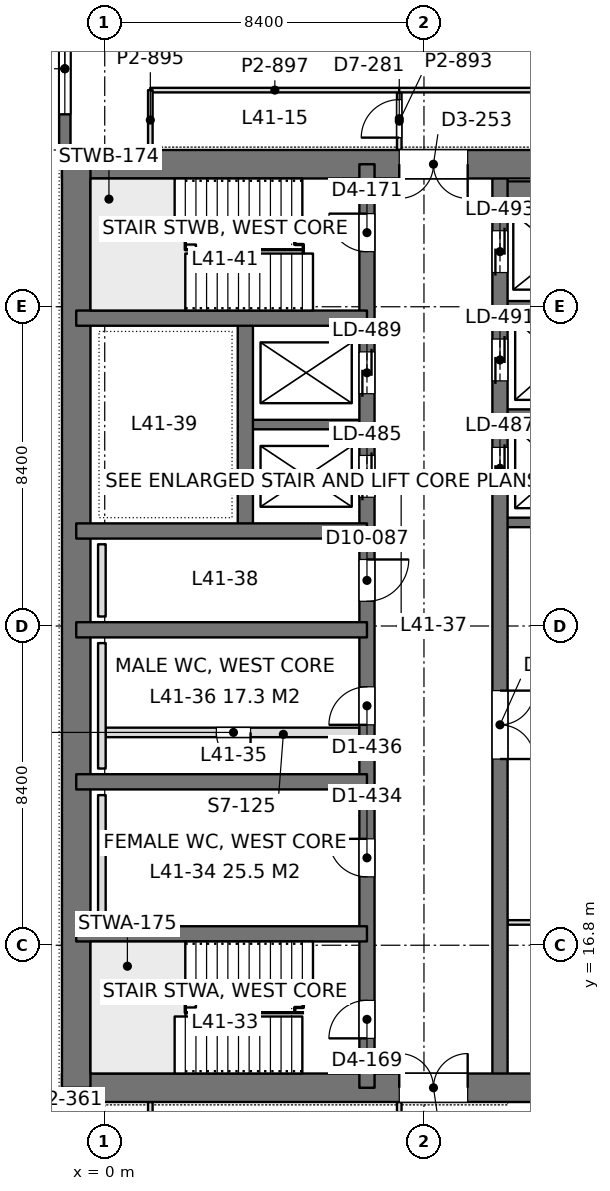
"""IFC4 building model, lengths in metres.
Left out: names, types, materials, properties, quantities, classifications, styles, units other than length and angle.
Written with IfcOpenShell. Run it as: python <this file> out.ifc"""

import sys

from ifc_helpers import new_model, si_unit, direction, frame, frame_2d, origin, place, context, subcontext, project, spatial, rectangle, extrude, element, fill, save


model = new_model("IFC4")
c1 = context("Model", 3, precision=1e-05, world=origin(), true_north=direction((0.0, 1.0)))
c2 = subcontext(c1, "Body", "Model", "MODEL_VIEW")
j1 = project(units=[si_unit("LENGTHUNIT", "METRE"), si_unit("PLANEANGLEUNIT", "RADIAN")], contexts=[c1])
p1 = place(None, origin())
s1 = spatial("IfcSite", under=j1, at=p1, CompositionType="ELEMENT")
p2 = place(p1, origin())
s2 = spatial("IfcBuilding", under=s1, at=p2, CompositionType="ELEMENT")
p3 = place(p2, frame((0.0, 0.0, 181.8)))
s3 = spatial("IfcBuildingStorey", under=s2, at=p3, CompositionType="ELEMENT", Elevation=181.8)
p4 = place(p3, frame((-1.125, 13.05, 0.0), z_axis=(0.0, 0.0, 1.0), x_axis=(1.0, 0.0, 0.0)))
e1 = element("IfcWall", 1, at=p4, inside=s3, PredefinedType="SHEAR", context=c2, shape_type="SweptSolid", body=[
    extrude(rectangle(XDim=17.85, YDim=0.75, at=frame_2d((8.925, 0.0))), origin(), (0.0, 0.0, 1.0), 4.2),
])
p5 = place(p4, frame((8.875, 0.0, 0.0)))
e2 = element("IfcOpeningElement", 2, at=p5, cuts=e1, PredefinedType="OPENING", context=c2, shape_type="SweptSolid", body=[
    extrude(rectangle(XDim=1.8, YDim=2.4, at=frame_2d((0.9, 1.2))), frame((0.0, 0.385, 0.0), z_axis=(0.0, -1.0, 0.0), x_axis=(1.0, 0.0, 0.0)), (0.0, 0.0, 1.0), 0.77),
])
p6 = place(p3, frame((-1.125, 37.35, 0.0), z_axis=(0.0, 0.0, 1.0), x_axis=(1.0, 0.0, 0.0)))
e3 = element("IfcWall", 3, at=p6, inside=s3, PredefinedType="SHEAR", context=c2, shape_type="SweptSolid", body=[
    extrude(rectangle(XDim=17.85, YDim=0.75, at=frame_2d((8.925, 0.0))), origin(), (0.0, 0.0, 1.0), 4.2),
])
p7 = place(p6, frame((8.875, 0.0, 0.0)))
e4 = element("IfcOpeningElement", 4, at=p7, cuts=e3, PredefinedType="OPENING", context=c2, shape_type="SweptSolid", body=[
    extrude(rectangle(XDim=1.8, YDim=2.4, at=frame_2d((0.9, 1.2))), frame((0.0, 0.385, 0.0), z_axis=(0.0, -1.0, 0.0), x_axis=(1.0, 0.0, 0.0)), (0.0, 0.0, 1.0), 0.77),
])
p8 = place(p3, frame((-0.75, 13.05, 0.0), z_axis=(0.0, 0.0, 1.0), x_axis=(0.0, 1.0, 0.0)))
e5 = element("IfcWall", 5, at=p8, inside=s3, PredefinedType="SHEAR", context=c2, shape_type="SweptSolid", body=[
    extrude(rectangle(XDim=24.3, YDim=0.75, at=frame_2d((12.15, 0.0))), origin(), (0.0, 0.0, 1.0), 4.2),
])
p9 = place(p3, frame((6.9, 13.05, 0.0), z_axis=(0.0, 0.0, 1.0), x_axis=(0.0, 1.0, 0.0)))
e6 = element("IfcWall", 6, at=p9, inside=s3, PredefinedType="SHEAR", context=c2, shape_type="SweptSolid", body=[
    extrude(rectangle(XDim=24.3, YDim=0.4, at=frame_2d((12.15, 0.0))), origin(), (0.0, 0.0, 1.0), 4.2),
])
p10 = place(p9, frame((1.3, 0.0, 0.0)))
e7 = element("IfcOpeningElement", 7, at=p10, cuts=e6, PredefinedType="OPENING", context=c2, shape_type="SweptSolid", body=[
    extrude(rectangle(XDim=1.0, YDim=2.2, at=frame_2d((0.5, 1.1))), frame((0.0, 0.21, 0.0), z_axis=(0.0, -1.0, 0.0), x_axis=(1.0, 0.0, 0.0)), (0.0, 0.0, 1.0), 0.42),
])
p11 = place(p9, frame((22.0, 0.0, 0.0)))
e8 = element("IfcOpeningElement", 8, at=p11, cuts=e6, PredefinedType="OPENING", context=c2, shape_type="SweptSolid", body=[
    extrude(rectangle(XDim=1.0, YDim=2.2, at=frame_2d((0.5, 1.1))), frame((0.0, 0.21, 0.0), z_axis=(0.0, -1.0, 0.0), x_axis=(1.0, 0.0, 0.0)), (0.0, 0.0, 1.0), 0.42),
])
p12 = place(p9, frame((5.55, 0.0, 0.0)))
e9 = element("IfcOpeningElement", 9, at=p12, cuts=e6, PredefinedType="OPENING", context=c2, shape_type="SweptSolid", body=[
    extrude(rectangle(XDim=1.0, YDim=2.2, at=frame_2d((0.5, 1.1))), frame((0.0, 0.21, 0.0), z_axis=(0.0, -1.0, 0.0), x_axis=(1.0, 0.0, 0.0)), (0.0, 0.0, 1.0), 0.42),
])
p13 = place(p9, frame((9.55, 0.0, 0.0)))
e10 = element("IfcOpeningElement", 10, at=p13, cuts=e6, PredefinedType="OPENING", context=c2, shape_type="SweptSolid", body=[
    extrude(rectangle(XDim=1.0, YDim=2.2, at=frame_2d((0.5, 1.1))), frame((0.0, 0.21, 0.0), z_axis=(0.0, -1.0, 0.0), x_axis=(1.0, 0.0, 0.0)), (0.0, 0.0, 1.0), 0.42),
])
p14 = place(p9, frame((12.8, 0.0, 0.0)))
e11 = element("IfcOpeningElement", 11, at=p14, cuts=e6, PredefinedType="OPENING", context=c2, shape_type="SweptSolid", body=[
    extrude(rectangle(XDim=1.1, YDim=2.2, at=frame_2d((0.55, 1.1))), frame((0.0, 0.21, 0.0), z_axis=(0.0, -1.0, 0.0), x_axis=(1.0, 0.0, 0.0)), (0.0, 0.0, 1.0), 0.42),
])
p15 = place(p9, frame((15.538, 0.0, 0.0)))
e12 = element("IfcOpeningElement", 12, at=p15, cuts=e6, PredefinedType="OPENING", context=c2, shape_type="SweptSolid", body=[
    extrude(rectangle(XDim=1.1, YDim=2.2, at=frame_2d((0.55, 1.1))), frame((0.0, 0.21, 0.0), z_axis=(0.0, -1.0, 0.0), x_axis=(1.0, 0.0, 0.0)), (0.0, 0.0, 1.0), 0.42),
])
p16 = place(p9, frame((18.262, 0.0, 0.0)))
e13 = element("IfcOpeningElement", 13, at=p16, cuts=e6, PredefinedType="OPENING", context=c2, shape_type="SweptSolid", body=[
    extrude(rectangle(XDim=1.1, YDim=2.2, at=frame_2d((0.55, 1.1))), frame((0.0, 0.21, 0.0), z_axis=(0.0, -1.0, 0.0), x_axis=(1.0, 0.0, 0.0)), (0.0, 0.0, 1.0), 0.42),
])
p17 = place(p3, frame((10.4, 13.05, 0.0), z_axis=(0.0, 0.0, 1.0), x_axis=(0.0, 1.0, 0.0)))
e14 = element("IfcWall", 14, at=p17, inside=s3, PredefinedType="SHEAR", context=c2, shape_type="SweptSolid", body=[
    extrude(rectangle(XDim=24.3, YDim=0.4, at=frame_2d((12.15, 0.0))), origin(), (0.0, 0.0, 1.0), 4.2),
])
p18 = place(p17, frame((15.75, 0.0, 0.0)))
e15 = element("IfcOpeningElement", 15, at=p18, cuts=e14, PredefinedType="OPENING", context=c2, shape_type="SweptSolid", body=[
    extrude(rectangle(XDim=1.1, YDim=2.2, at=frame_2d((0.55, 1.1))), frame((0.0, 0.21, 0.0), z_axis=(0.0, -1.0, 0.0), x_axis=(1.0, 0.0, 0.0)), (0.0, 0.0, 1.0), 0.42),
])
p19 = place(p17, frame((18.6, 0.0, 0.0)))
e16 = element("IfcOpeningElement", 16, at=p19, cuts=e14, PredefinedType="OPENING", context=c2, shape_type="SweptSolid", body=[
    extrude(rectangle(XDim=1.1, YDim=2.2, at=frame_2d((0.55, 1.1))), frame((0.0, 0.21, 0.0), z_axis=(0.0, -1.0, 0.0), x_axis=(1.0, 0.0, 0.0)), (0.0, 0.0, 1.0), 0.42),
])
p20 = place(p17, frame((21.45, 0.0, 0.0)))
e17 = element("IfcOpeningElement", 17, at=p20, cuts=e14, PredefinedType="OPENING", context=c2, shape_type="SweptSolid", body=[
    extrude(rectangle(XDim=1.1, YDim=2.2, at=frame_2d((0.55, 1.1))), frame((0.0, 0.21, 0.0), z_axis=(0.0, -1.0, 0.0), x_axis=(1.0, 0.0, 0.0)), (0.0, 0.0, 1.0), 0.42),
])
p21 = place(p17, frame((8.65, 0.0, 0.0)))
e18 = element("IfcOpeningElement", 18, at=p21, cuts=e14, PredefinedType="OPENING", context=c2, shape_type="SweptSolid", body=[
    extrude(rectangle(XDim=1.8, YDim=2.4, at=frame_2d((0.9, 1.2))), frame((0.0, 0.21, 0.0), z_axis=(0.0, -1.0, 0.0), x_axis=(1.0, 0.0, 0.0)), (0.0, 0.0, 1.0), 0.42),
])
for number, where, z_axis, x_axis in (
    (19, (-0.75, 17.1, 0.0), (0.0, 0.0, 1.0), (1.0, 0.0, 0.0)),
    (20, (-0.75, 21.1, 0.0), (0.0, 0.0, 1.0), (1.0, 0.0, 0.0)),
    (21, (-0.75, 25.1, 0.0), (0.0, 0.0, 1.0), (1.0, 0.0, 0.0)),
    (22, (-0.75, 27.7, 0.0), (0.0, 0.0, 1.0), (1.0, 0.0, 0.0)),
    (23, (-0.75, 33.3, 0.0), (0.0, 0.0, 1.0), (1.0, 0.0, 0.0)),
):
    element("IfcWall", number, at=place(p3, frame(where, z_axis=z_axis, x_axis=x_axis)), inside=s3, PredefinedType="SHEAR", context=c2, shape_type="SweptSolid", body=[
        extrude(rectangle(XDim=7.65, YDim=0.4, at=frame_2d((3.825, 0.0))), origin(), (0.0, 0.0, 1.0), 4.2),
    ])
p22 = place(p3, frame((3.7, 27.7, 0.0), z_axis=(0.0, 0.0, 1.0), x_axis=(0.0, 1.0, 0.0)))
e24 = element("IfcWall", 24, at=p22, inside=s3, PredefinedType="SHEAR", context=c2, shape_type="SweptSolid", body=[
    extrude(rectangle(XDim=5.6, YDim=0.4, at=frame_2d((2.8, 0.0))), origin(), (0.0, 0.0, 1.0), 4.2),
])
p23 = place(p3, frame((3.7, 30.5, 0.0), z_axis=(0.0, 0.0, 1.0), x_axis=(1.0, 0.0, 0.0)))
e25 = element("IfcWall", 25, at=p23, inside=s3, PredefinedType="SHEAR", context=c2, shape_type="SweptSolid", body=[
    extrude(rectangle(XDim=3.2, YDim=0.25, at=frame_2d((1.6, 0.0))), origin(), (0.0, 0.0, 1.0), 4.2),
])
p24 = place(p3, frame((10.4, 27.925, 0.0), z_axis=(0.0, 0.0, 1.0), x_axis=(1.0, 0.0, 0.0)))
e26 = element("IfcWall", 26, at=p24, inside=s3, PredefinedType="SHEAR", context=c2, shape_type="SweptSolid", body=[
    extrude(rectangle(XDim=5.95, YDim=0.25, at=frame_2d((2.975, 0.0))), origin(), (0.0, 0.0, 1.0), 4.2),
])
for number, where, z_axis, x_axis in (
    (27, (10.4, 30.775, 0.0), (0.0, 0.0, 1.0), (1.0, 0.0, 0.0)),
    (28, (10.4, 33.625, 0.0), (0.0, 0.0, 1.0), (1.0, 0.0, 0.0)),
):
    element("IfcWall", number, at=place(p3, frame(where, z_axis=z_axis, x_axis=x_axis)), inside=s3, PredefinedType="SHEAR", context=c2, shape_type="SweptSolid", body=[
        extrude(rectangle(XDim=3.2, YDim=0.25, at=frame_2d((1.6, 0.0))), origin(), (0.0, 0.0, 1.0), 4.2),
    ])
p25 = place(p3, frame((10.4, 36.625, 0.0), z_axis=(0.0, 0.0, 1.0), x_axis=(1.0, 0.0, 0.0)))
e29 = element("IfcWall", 29, at=p25, inside=s3, PredefinedType="SHEAR", context=c2, shape_type="SweptSolid", body=[
    extrude(rectangle(XDim=3.2, YDim=0.55, at=frame_2d((1.6, 0.0))), origin(), (0.0, 0.0, 1.0), 4.2),
])
p26 = place(p3, frame((-1.05, 8.4, 0.0), z_axis=(0.0, 0.0, 1.0), x_axis=(0.0, 1.0, 0.0)))
e30 = element("IfcWall", 30, at=p26, inside=s3, PredefinedType="SOLIDWALL", context=c2, shape_type="SweptSolid", body=[
    extrude(rectangle(XDim=4.275, YDim=0.3, at=frame_2d((2.138, 0.0))), origin(), (0.0, 0.0, 1.0), 4.05),
])
p27 = place(p26, frame((0.938, 0.0, 0.9)))
e31 = element("IfcOpeningElement", 31, at=p27, cuts=e30, PredefinedType="OPENING", context=c2, shape_type="SweptSolid", body=[
    extrude(rectangle(XDim=2.4, YDim=1.9, at=frame_2d((1.2, 0.95))), frame((0.0, 0.16, 0.0), z_axis=(0.0, -1.0, 0.0), x_axis=(1.0, 0.0, 0.0)), (0.0, 0.0, 1.0), 0.32),
])
p28 = place(p3, frame((-1.05, 37.725, 0.0), z_axis=(0.0, 0.0, 1.0), x_axis=(0.0, 1.0, 0.0)))
e32 = element("IfcWall", 32, at=p28, inside=s3, PredefinedType="SOLIDWALL", context=c2, shape_type="SweptSolid", body=[
    extrude(rectangle(XDim=4.275, YDim=0.3, at=frame_2d((2.137, 0.0))), origin(), (0.0, 0.0, 1.0), 4.05),
])
p29 = place(p28, frame((0.938, 0.0, 0.9)))
e33 = element("IfcOpeningElement", 33, at=p29, cuts=e32, PredefinedType="OPENING", context=c2, shape_type="SweptSolid", body=[
    extrude(rectangle(XDim=2.4, YDim=1.9, at=frame_2d((1.2, 0.95))), frame((0.0, 0.16, 0.0), z_axis=(0.0, -1.0, 0.0), x_axis=(1.0, 0.0, 0.0)), (0.0, 0.0, 1.0), 0.32),
])
p30 = place(p3, frame((10.598, 17.4, 0.0), z_axis=(0.0, 0.0, 1.0), x_axis=(1.0, 0.0, 0.0)))
e34 = element("IfcWall", 34, at=p30, inside=s3, PredefinedType="PARTITIONING", context=c2, shape_type="SweptSolid", body=[
    extrude(rectangle(XDim=5.904, YDim=0.12, at=frame_2d((2.952, 0.0))), origin(), (0.0, 0.0, 1.0), 3.55),
])
p31 = place(p3, frame((7.75, 11.158, 0.0), z_axis=(0.0, 0.0, 1.0), x_axis=(0.0, 1.0, 0.0)))
e35 = element("IfcWall", 35, at=p31, inside=s3, PredefinedType="PARTITIONING", context=c2, shape_type="SweptSolid", body=[
    extrude(rectangle(XDim=1.518, YDim=0.12, at=frame_2d((0.759, 0.0))), origin(), (0.0, 0.0, 1.0), 4.05),
])
p32 = place(p31, frame((0.192, 0.0, 0.0)))
e36 = element("IfcOpeningElement", 36, at=p32, cuts=e35, PredefinedType="OPENING", context=c2, shape_type="SweptSolid", body=[
    extrude(rectangle(XDim=1.0, YDim=2.4, at=frame_2d((0.5, 1.2))), frame((0.0, 0.07, 0.0), z_axis=(0.0, -1.0, 0.0), x_axis=(1.0, 0.0, 0.0)), (0.0, 0.0, 1.0), 0.14),
])
p33 = place(p3, frame((1.2, 11.1, 0.0), z_axis=(0.0, 0.0, 1.0), x_axis=(0.0, 1.0, 0.0)))
e37 = element("IfcWall", 37, at=p33, inside=s3, PredefinedType="PARTITIONING", context=c2, shape_type="SweptSolid", body=[
    extrude(rectangle(XDim=1.576, YDim=0.12, at=frame_2d((0.788, 0.0))), origin(), (0.0, 0.0, 1.0), 4.05),
])
p34 = place(p3, frame((7.748, 39.3, 0.0), z_axis=(0.0, 0.0, 1.0), x_axis=(1.0, 0.0, 0.0)))
e38 = element("IfcWall", 38, at=p34, inside=s3, PredefinedType="PARTITIONING", context=c2, shape_type="SweptSolid", body=[
    extrude(rectangle(XDim=34.904, YDim=0.12, at=frame_2d((17.452, 0.0))), origin(), (0.0, 0.0, 1.0), 3.55),
])
p35 = place(p34, frame((10.735, 0.0, 0.0)))
e39 = element("IfcOpeningElement", 39, at=p35, cuts=e38, PredefinedType="OPENING", context=c2, shape_type="SweptSolid", body=[
    extrude(rectangle(XDim=1.8, YDim=2.2, at=frame_2d((0.9, 1.1))), frame((0.0, 0.07, 0.0), z_axis=(0.0, -1.0, 0.0), x_axis=(1.0, 0.0, 0.0)), (0.0, 0.0, 1.0), 0.14),
])
p36 = place(p34, frame((22.369, 0.0, 0.0)))
e40 = element("IfcOpeningElement", 40, at=p36, cuts=e38, PredefinedType="OPENING", context=c2, shape_type="SweptSolid", body=[
    extrude(rectangle(XDim=1.8, YDim=2.2, at=frame_2d((0.9, 1.1))), frame((0.0, 0.07, 0.0), z_axis=(0.0, -1.0, 0.0), x_axis=(1.0, 0.0, 0.0)), (0.0, 0.0, 1.0), 0.14),
])
p37 = place(p3, frame((7.75, 37.724, 0.0), z_axis=(0.0, 0.0, 1.0), x_axis=(0.0, 1.0, 0.0)))
e41 = element("IfcWall", 41, at=p37, inside=s3, PredefinedType="PARTITIONING", context=c2, shape_type="SweptSolid", body=[
    extrude(rectangle(XDim=1.518, YDim=0.12, at=frame_2d((0.759, 0.0))), origin(), (0.0, 0.0, 1.0), 4.05),
])
p38 = place(p37, frame((0.326, 0.0, 0.0)))
e42 = element("IfcOpeningElement", 42, at=p38, cuts=e41, PredefinedType="OPENING", context=c2, shape_type="SweptSolid", body=[
    extrude(rectangle(XDim=1.0, YDim=2.4, at=frame_2d((0.5, 1.2))), frame((0.0, 0.07, 0.0), z_axis=(0.0, -1.0, 0.0), x_axis=(1.0, 0.0, 0.0)), (0.0, 0.0, 1.0), 0.14),
])
p39 = place(p3, frame((1.2, 39.3, 0.0), z_axis=(0.0, 0.0, 1.0), x_axis=(1.0, 0.0, 0.0)))
e43 = element("IfcWall", 43, at=p39, inside=s3, PredefinedType="PARTITIONING", context=c2, shape_type="SweptSolid", body=[
    extrude(rectangle(XDim=6.552, YDim=0.12, at=frame_2d((3.276, 0.0))), origin(), (0.0, 0.0, 1.0), 3.69),
])
p40 = place(p3, frame((1.2, 37.724, 0.0), z_axis=(0.0, 0.0, 1.0), x_axis=(0.0, 1.0, 0.0)))
e44 = element("IfcWall", 44, at=p40, inside=s3, PredefinedType="PARTITIONING", context=c2, shape_type="SweptSolid", body=[
    extrude(rectangle(XDim=1.576, YDim=0.12, at=frame_2d((0.788, 0.0))), origin(), (0.0, 0.0, 1.0), 4.05),
])
p41 = place(p3, frame((0.025, 22.4, 0.0), z_axis=(0.0, 0.0, 1.0), x_axis=(1.0, 0.0, 0.0)))
e45 = element("IfcWall", 45, at=p41, inside=s3, PredefinedType="PARTITIONING", context=c2, shape_type="SweptSolid", body=[
    extrude(rectangle(XDim=6.675, YDim=0.25, at=frame_2d((3.337, 0.0))), origin(), (0.0, 0.0, 1.0), 4.0),
])
p42 = place(p41, frame((2.913, 0.0, 0.0)))
e46 = element("IfcOpeningElement", 46, at=p42, cuts=e45, PredefinedType="OPENING", context=c2, shape_type="SweptSolid", body=[
    extrude(rectangle(XDim=0.9, YDim=2.2, at=frame_2d((0.45, 1.1))), frame((0.0, 0.135, 0.0), z_axis=(0.0, -1.0, 0.0), x_axis=(1.0, 0.0, 0.0)), (0.0, 0.0, 1.0), 0.27),
])
for number, where, z_axis, x_axis in (
    (47, (-0.075, 17.45, 0.0), (0.0, 0.0, 1.0), (0.0, 1.0, 0.0)),
    (48, (-0.075, 21.45, 0.0), (0.0, 0.0, 1.0), (0.0, 1.0, 0.0)),
):
    element("IfcWall", number, at=place(p3, frame(where, z_axis=z_axis, x_axis=x_axis)), inside=s3, PredefinedType="PLUMBINGWALL", context=c2, shape_type="SweptSolid", body=[
        extrude(rectangle(XDim=3.3, YDim=0.2, at=frame_2d((1.65, 0.0))), origin(), (0.0, 0.0, 1.0), 1.2),
    ])
p43 = place(p3, frame((-0.075, 25.45, 0.0), z_axis=(0.0, 0.0, 1.0), x_axis=(0.0, 1.0, 0.0)))
e49 = element("IfcWall", 49, at=p43, inside=s3, PredefinedType="PLUMBINGWALL", context=c2, shape_type="SweptSolid", body=[
    extrude(rectangle(XDim=1.9, YDim=0.2, at=frame_2d((0.95, 0.0))), origin(), (0.0, 0.0, 1.0), 1.2),
])
p44 = place(p29, origin())
e50 = element("IfcWindow", 50, at=p44, inside=s3, PartitioningType="SINGLE_PANEL", PredefinedType="WINDOW", context=c2, shape_type="SweptSolid", body=[
    extrude(rectangle(XDim=2.4, YDim=1.9, at=frame_2d((1.2, 0.95))), frame((0.0, 0.03, 0.0), z_axis=(0.0, -1.0, 0.0), x_axis=(1.0, 0.0, 0.0)), (0.0, 0.0, 1.0), 0.06),
])
fill(e33, e50)
p45 = place(p5, origin())
e51 = element("IfcDoor", 51, at=p45, inside=s3, OperationType="DOUBLE_DOOR_SINGLE_SWING", PredefinedType="DOOR", context=c2, shape_type="SweptSolid", body=[
    extrude(rectangle(XDim=1.8, YDim=2.4, at=frame_2d((0.9, 1.2))), frame((0.0, 0.025, 0.0), z_axis=(0.0, -1.0, 0.0), x_axis=(1.0, 0.0, 0.0)), (0.0, 0.0, 1.0), 0.05),
])
fill(e2, e51)
p46 = place(p7, frame((1.8, 0.0, 0.0), z_axis=(0.0, 0.0, 1.0), x_axis=(-1.0, 0.0, 0.0)))
e52 = element("IfcDoor", 52, at=p46, inside=s3, OperationType="DOUBLE_DOOR_SINGLE_SWING", PredefinedType="DOOR", context=c2, shape_type="SweptSolid", body=[
    extrude(rectangle(XDim=1.8, YDim=2.4, at=frame_2d((0.9, 1.2))), frame((0.0, 0.025, 0.0), z_axis=(0.0, -1.0, 0.0), x_axis=(1.0, 0.0, 0.0)), (0.0, 0.0, 1.0), 0.05),
])
fill(e4, e52)
p47 = place(p10, origin())
e53 = element("IfcDoor", 53, at=p47, inside=s3, OperationType="SINGLE_SWING_LEFT", PredefinedType="DOOR", context=c2, shape_type="SweptSolid", body=[
    extrude(rectangle(XDim=1.0, YDim=2.2, at=frame_2d((0.5, 1.1))), frame((0.0, 0.025, 0.0), z_axis=(0.0, -1.0, 0.0), x_axis=(1.0, 0.0, 0.0)), (0.0, 0.0, 1.0), 0.05),
])
fill(e7, e53)
p48 = place(p11, origin())
e54 = element("IfcDoor", 54, at=p48, inside=s3, OperationType="SINGLE_SWING_RIGHT", PredefinedType="DOOR", context=c2, shape_type="SweptSolid", body=[
    extrude(rectangle(XDim=1.0, YDim=2.2, at=frame_2d((0.5, 1.1))), frame((0.0, 0.025, 0.0), z_axis=(0.0, -1.0, 0.0), x_axis=(1.0, 0.0, 0.0)), (0.0, 0.0, 1.0), 0.05),
])
fill(e8, e54)
p49 = place(p12, origin())
e55 = element("IfcDoor", 55, at=p49, inside=s3, OperationType="SINGLE_SWING_RIGHT", PredefinedType="DOOR", context=c2, shape_type="SweptSolid", body=[
    extrude(rectangle(XDim=1.0, YDim=2.2, at=frame_2d((0.5, 1.1))), frame((0.0, 0.025, 0.0), z_axis=(0.0, -1.0, 0.0), x_axis=(1.0, 0.0, 0.0)), (0.0, 0.0, 1.0), 0.05),
])
fill(e9, e55)
p50 = place(p13, origin())
e56 = element("IfcDoor", 56, at=p50, inside=s3, OperationType="SINGLE_SWING_LEFT", PredefinedType="DOOR", context=c2, shape_type="SweptSolid", body=[
    extrude(rectangle(XDim=1.0, YDim=2.2, at=frame_2d((0.5, 1.1))), frame((0.0, 0.025, 0.0), z_axis=(0.0, -1.0, 0.0), x_axis=(1.0, 0.0, 0.0)), (0.0, 0.0, 1.0), 0.05),
])
fill(e10, e56)
p51 = place(p14, frame((1.1, 0.0, 0.0), z_axis=(0.0, 0.0, 1.0), x_axis=(-1.0, 0.0, 0.0)))
e57 = element("IfcDoor", 57, at=p51, inside=s3, OperationType="SINGLE_SWING_LEFT", PredefinedType="DOOR", context=c2, shape_type="SweptSolid", body=[
    extrude(rectangle(XDim=1.1, YDim=2.2, at=frame_2d((0.55, 1.1))), frame((0.0, 0.025, 0.0), z_axis=(0.0, -1.0, 0.0), x_axis=(1.0, 0.0, 0.0)), (0.0, 0.0, 1.0), 0.05),
])
fill(e11, e57)
p52 = place(p18, origin())
e58 = element("IfcDoor", 58, at=p52, inside=s3, OperationType="DOUBLE_DOOR_SLIDING", PredefinedType="DOOR", context=c2, shape_type="SweptSolid", body=[
    extrude(rectangle(XDim=1.1, YDim=2.2, at=frame_2d((0.55, 1.1))), frame((0.0, 0.025, 0.0), z_axis=(0.0, -1.0, 0.0), x_axis=(1.0, 0.0, 0.0)), (0.0, 0.0, 1.0), 0.05),
])
fill(e15, e58)
p53 = place(p19, origin())
e59 = element("IfcDoor", 59, at=p53, inside=s3, OperationType="DOUBLE_DOOR_SLIDING", PredefinedType="DOOR", context=c2, shape_type="SweptSolid", body=[
    extrude(rectangle(XDim=1.1, YDim=2.2, at=frame_2d((0.55, 1.1))), frame((0.0, 0.025, 0.0), z_axis=(0.0, -1.0, 0.0), x_axis=(1.0, 0.0, 0.0)), (0.0, 0.0, 1.0), 0.05),
])
fill(e16, e59)
p54 = place(p20, origin())
e60 = element("IfcDoor", 60, at=p54, inside=s3, OperationType="DOUBLE_DOOR_SLIDING", PredefinedType="DOOR", context=c2, shape_type="SweptSolid", body=[
    extrude(rectangle(XDim=1.1, YDim=2.2, at=frame_2d((0.55, 1.1))), frame((0.0, 0.025, 0.0), z_axis=(0.0, -1.0, 0.0), x_axis=(1.0, 0.0, 0.0)), (0.0, 0.0, 1.0), 0.05),
])
fill(e17, e60)
p55 = place(p15, origin())
e61 = element("IfcDoor", 61, at=p55, inside=s3, OperationType="DOUBLE_DOOR_SLIDING", PredefinedType="DOOR", context=c2, shape_type="SweptSolid", body=[
    extrude(rectangle(XDim=1.1, YDim=2.2, at=frame_2d((0.55, 1.1))), frame((0.0, 0.025, 0.0), z_axis=(0.0, -1.0, 0.0), x_axis=(1.0, 0.0, 0.0)), (0.0, 0.0, 1.0), 0.05),
])
fill(e12, e61)
p56 = place(p16, origin())
e62 = element("IfcDoor", 62, at=p56, inside=s3, OperationType="DOUBLE_DOOR_SLIDING", PredefinedType="DOOR", context=c2, shape_type="SweptSolid", body=[
    extrude(rectangle(XDim=1.1, YDim=2.2, at=frame_2d((0.55, 1.1))), frame((0.0, 0.025, 0.0), z_axis=(0.0, -1.0, 0.0), x_axis=(1.0, 0.0, 0.0)), (0.0, 0.0, 1.0), 0.05),
])
fill(e13, e62)
p57 = place(p21, frame((1.8, 0.0, 0.0), z_axis=(0.0, 0.0, 1.0), x_axis=(-1.0, 0.0, 0.0)))
e63 = element("IfcDoor", 63, at=p57, inside=s3, OperationType="DOUBLE_DOOR_SINGLE_SWING", PredefinedType="DOOR", context=c2, shape_type="SweptSolid", body=[
    extrude(rectangle(XDim=1.8, YDim=2.4, at=frame_2d((0.9, 1.2))), frame((0.0, 0.025, 0.0), z_axis=(0.0, -1.0, 0.0), x_axis=(1.0, 0.0, 0.0)), (0.0, 0.0, 1.0), 0.05),
])
fill(e18, e63)
p58 = place(p38, origin())
e64 = element("IfcDoor", 64, at=p58, inside=s3, OperationType="SINGLE_SWING_LEFT", PredefinedType="DOOR", context=c2, shape_type="SweptSolid", body=[
    extrude(rectangle(XDim=1.0, YDim=2.4, at=frame_2d((0.5, 1.2))), frame((0.0, 0.025, 0.0), z_axis=(0.0, -1.0, 0.0), x_axis=(1.0, 0.0, 0.0)), (0.0, 0.0, 1.0), 0.05),
])
fill(e42, e64)
p59 = place(p42, frame((0.9, 0.0, 0.0), z_axis=(0.0, 0.0, 1.0), x_axis=(-1.0, 0.0, 0.0)))
e65 = element("IfcDoor", 65, at=p59, inside=s3, OperationType="SINGLE_SWING_LEFT", PredefinedType="DOOR", context=c2, shape_type="SweptSolid", body=[
    extrude(rectangle(XDim=0.9, YDim=2.2, at=frame_2d((0.45, 1.1))), frame((0.0, 0.025, 0.0), z_axis=(0.0, -1.0, 0.0), x_axis=(1.0, 0.0, 0.0)), (0.0, 0.0, 1.0), 0.05),
])
fill(e46, e65)
save(model, sys.argv[1])
